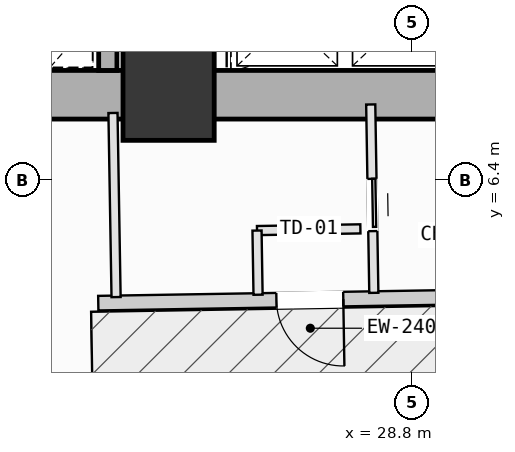
"""IFC4 building model, lengths in metres.
Left out: names, types, materials, properties, quantities, classifications, styles, units other than length and angle.
Written with IfcOpenShell. Run it as: python <this file> out.ifc"""

import sys

from ifc_helpers import new_model, si_unit, direction, frame, frame_2d, origin, origin_2d, place, context, subcontext, project, spatial, rectangle, extrude, element, fill, save


model = new_model("IFC4")
c1 = context("Model", 3, precision=1e-05, world=origin(), true_north=direction((0.0, 1.0)))
c2 = subcontext(c1, "Body", "Model", "MODEL_VIEW")
j1 = project(units=[si_unit("LENGTHUNIT", "METRE"), si_unit("PLANEANGLEUNIT", "RADIAN")], contexts=[c1])
p1 = place(None, origin())
s1 = spatial("IfcSite", under=j1, at=p1, CompositionType="ELEMENT")
p2 = place(p1, origin())
s2 = spatial("IfcBuilding", under=s1, at=p2, CompositionType="ELEMENT")
p3 = place(p2, frame((0.0, 0.0, 27.0)))
s3 = spatial("IfcBuildingStorey", under=s2, at=p3, CompositionType="ELEMENT", Elevation=27.0)
p4 = place(p3, frame((24.8, 7.8, 0.0), z_axis=(0.0, 0.0, 1.0), x_axis=(1.0, 0.0, 0.0)))
e1 = element("IfcColumn", 1, at=p4, inside=s3, PredefinedType="COLUMN", context=c2, shape_type="SweptSolid", body=[
    extrude(rectangle(XDim=1.5, YDim=1.5, at=origin_2d()), origin(), (0.0, 0.0, 1.0), 4.0),
])
p5 = place(p3, frame((23.975, 2.385, 0.049), z_axis=(0.09275167564, -0.038933561459, 0.994927788565), x_axis=(0.37178205888, 0.928318544007, 0.001667797575)))
e2 = element("IfcColumn", 2, at=p5, inside=s3, PredefinedType="COLUMN", context=c2, shape_type="SweptSolid", body=[
    extrude(rectangle(XDim=1.6, YDim=0.9, at=origin_2d()), origin(), (0.0, 0.0, 1.0), 3.969),
])
p6 = place(p3, frame((30.602, 4.488, 0.0), z_axis=(0.0, 0.0, 1.0), x_axis=(-0.999862345318, -0.016591877959, 0.0)))
e3 = element("IfcWall", 3, at=p6, inside=s3, PredefinedType="SOLIDWALL", context=c2, shape_type="SweptSolid", body=[
    extrude(rectangle(XDim=6.96, YDim=0.24, at=frame_2d((3.48, 0.0))), origin(), (0.0, 0.0, 1.0), 3.165),
])
p7 = place(p6, frame((2.93, 0.0, 0.0)))
e4 = element("IfcOpeningElement", 4, at=p7, cuts=e3, PredefinedType="OPENING", context=c2, shape_type="SweptSolid", body=[
    extrude(rectangle(XDim=1.1, YDim=2.15, at=frame_2d((0.55, 1.075))), frame((0.0, 0.13, 0.0), z_axis=(0.0, -1.0, 0.0), x_axis=(1.0, 0.0, 0.0)), (0.0, 0.0, 1.0), 0.26),
])
for number, where, z_axis, x_axis in (
    (5, (14.0, 7.8, 0.0), (0.0, 0.0, 1.0), (1.0, 0.0, 0.0)),
    (6, (24.8, 7.8, 0.0), (0.0, 0.0, 1.0), (1.0, 0.0, 0.0)),
):
    element("IfcWall", number, at=place(p3, frame(where, z_axis=z_axis, x_axis=x_axis)), inside=s3, PredefinedType="SHEAR", context=c2, shape_type="SweptSolid", body=[
        extrude(rectangle(XDim=10.8, YDim=0.8, at=frame_2d((5.4, 0.0))), origin(), (0.0, 0.0, 1.0), 3.78),
    ])
p8 = place(p3, frame((23.8, 8.2, 0.0), z_axis=(0.0, 0.0, 1.0), x_axis=(0.0, 1.0, 0.0)))
e7 = element("IfcWall", 7, at=p8, inside=s3, PredefinedType="SOLIDWALL", context=c2, shape_type="SweptSolid", body=[
    extrude(rectangle(XDim=2.48, YDim=0.3, at=frame_2d((1.24, 0.0))), origin(), (0.0, 0.0, 1.0), 3.78),
])
p9 = place(p3, frame((28.124, 7.64, 0.0), z_axis=(0.0, 0.0, 1.0), x_axis=(0.016468725329, -0.999864381347, 0.0)))
e8 = element("IfcWall", 8, at=p9, inside=s3, PredefinedType="PARTITIONING", context=c2, shape_type="SweptSolid", body=[
    extrude(rectangle(XDim=3.098, YDim=0.15, at=frame_2d((1.549, 0.0))), origin(), (0.0, 0.0, 1.0), 3.78),
])
p10 = place(p9, frame((1.223, 0.0, 0.0)))
e9 = element("IfcOpeningElement", 9, at=p10, cuts=e8, PredefinedType="OPENING", context=c2, shape_type="SweptSolid", body=[
    extrude(rectangle(XDim=0.86, YDim=2.06, at=frame_2d((0.43, 1.03))), frame((0.0, 0.085, 0.0), z_axis=(0.0, -1.0, 0.0), x_axis=(1.0, 0.0, 0.0)), (0.0, 0.0, 1.0), 0.17),
])
p11 = place(p3, frame((27.954, 5.594, 0.0), z_axis=(0.0, 0.0, 1.0), x_axis=(-0.999863680072, -0.016511246871, 0.0)))
e10 = element("IfcWall", 10, at=p11, inside=s3, PredefinedType="PARTITIONING", context=c2, shape_type="SweptSolid", body=[
    extrude(rectangle(XDim=1.7, YDim=0.15, at=frame_2d((0.85, 0.0))), origin(), (0.0, 0.0, 1.0), 3.78),
])
p12 = place(p3, frame((26.254, 5.566, 0.0), z_axis=(0.0, 0.0, 1.0), x_axis=(0.016197828387, -0.999868806572, 0.0)))
e11 = element("IfcWall", 11, at=p12, inside=s3, PredefinedType="PARTITIONING", context=c2, shape_type="SweptSolid", body=[
    extrude(rectangle(XDim=1.055, YDim=0.15, at=frame_2d((0.528, 0.0))), origin(), (0.0, 0.0, 1.0), 3.78),
])
p13 = place(p3, frame((23.936, 4.472, 0.0), z_axis=(0.0, 0.0, 1.0), x_axis=(-0.01684837005, 0.999858056139, 0.0)))
e12 = element("IfcWall", 12, at=p13, inside=s3, PredefinedType="PARTITIONING", context=c2, shape_type="SweptSolid", body=[
    extrude(rectangle(XDim=3.029, YDim=0.15, at=frame_2d((1.514, 0.0))), origin(), (0.0, 0.0, 1.0), 3.78),
])
p14 = place(p7, origin())
e13 = element("IfcDoor", 13, at=p14, inside=s3, OperationType="SINGLE_SWING_LEFT", PredefinedType="DOOR", context=c2, shape_type="SweptSolid", body=[
    extrude(rectangle(XDim=1.1, YDim=2.15, at=frame_2d((0.55, 1.075))), frame((0.0, 0.025, 0.0), z_axis=(0.0, -1.0, 0.0), x_axis=(1.0, 0.0, 0.0)), (0.0, 0.0, 1.0), 0.05),
])
fill(e4, e13)
p15 = place(p10, origin())
e14 = element("IfcDoor", 14, at=p15, inside=s3, OperationType="SLIDING_TO_LEFT", PredefinedType="DOOR", context=c2, shape_type="SweptSolid", body=[
    extrude(rectangle(XDim=0.86, YDim=2.06, at=frame_2d((0.43, 1.03))), frame((0.0, 0.025, 0.0), z_axis=(0.0, -1.0, 0.0), x_axis=(1.0, 0.0, 0.0)), (0.0, 0.0, 1.0), 0.05),
])
fill(e9, e14)
save(model, sys.argv[1])
